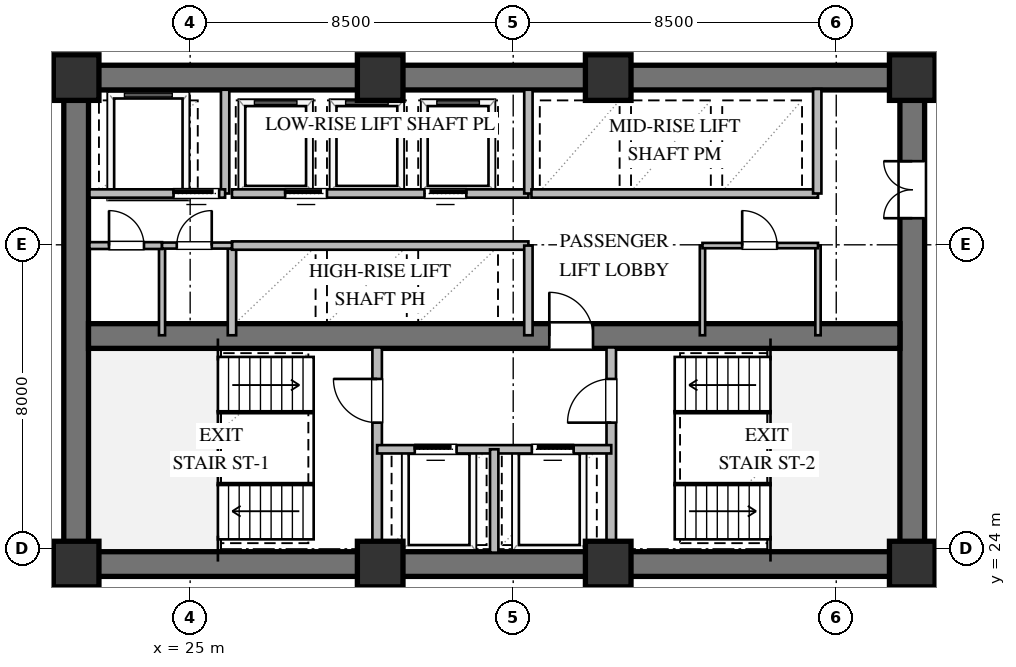
"""IFC4 building model, lengths in metres.
Left out: names, types, materials, properties, quantities, classifications, styles, units other than length and angle.
Written with IfcOpenShell. Run it as: python <this file> out.ifc"""

import sys

from ifc_helpers import new_model, si_unit, direction, frame, frame_2d, origin, origin_2d, place, context, subcontext, project, spatial, rectangle, extrude, element, fill, save


model = new_model("IFC4")
c1 = context("Model", 3, precision=1e-05, world=origin(), true_north=direction((0.0, 1.0)))
c2 = subcontext(c1, "Body", "Model", "MODEL_VIEW")
j1 = project(units=[si_unit("LENGTHUNIT", "METRE"), si_unit("PLANEANGLEUNIT", "RADIAN")], contexts=[c1])
p1 = place(None, origin())
s1 = spatial("IfcSite", under=j1, at=p1, CompositionType="ELEMENT")
p2 = place(p1, origin())
s2 = spatial("IfcBuilding", under=s1, at=p2, CompositionType="ELEMENT")
p3 = place(p2, frame((0.0, 0.0, 38.4)))
s3 = spatial("IfcBuildingStorey", under=s2, at=p3, CompositionType="ELEMENT", Elevation=38.4)
for number, where, z_axis, x_axis in (
    (1, (21.675, 23.6, 0.0), (0.0, 0.0, 1.0), (1.0, 0.0, 0.0)),
    (2, (21.675, 36.4, 0.0), (0.0, 0.0, 1.0), (1.0, 0.0, 0.0)),
):
    element("IfcWall", number, at=place(p3, frame(where, z_axis=z_axis, x_axis=x_axis)), inside=s3, PredefinedType="SHEAR", context=c2, shape_type="SweptSolid", body=[
        extrude(rectangle(XDim=22.65, YDim=0.65, at=frame_2d((11.325, 0.0))), origin(), (0.0, 0.0, 1.0), 3.36),
    ])
p4 = place(p3, frame((22.0, 23.925, 0.0), z_axis=(0.0, 0.0, 1.0), x_axis=(0.0, 1.0, 0.0)))
e3 = element("IfcWall", 3, at=p4, inside=s3, PredefinedType="SHEAR", context=c2, shape_type="SweptSolid", body=[
    extrude(rectangle(XDim=12.15, YDim=0.65, at=frame_2d((6.075, 0.0))), origin(), (0.0, 0.0, 1.0), 3.36),
])
p5 = place(p3, frame((44.0, 23.925, 0.0), z_axis=(0.0, 0.0, 1.0), x_axis=(0.0, 1.0, 0.0)))
e4 = element("IfcWall", 4, at=p5, inside=s3, PredefinedType="SHEAR", context=c2, shape_type="SweptSolid", body=[
    extrude(rectangle(XDim=12.15, YDim=0.65, at=frame_2d((6.075, 0.0))), origin(), (0.0, 0.0, 1.0), 3.36),
])
p6 = place(p5, frame((8.775, 0.0, 0.0)))
e5 = element("IfcOpeningElement", 5, at=p6, cuts=e4, PredefinedType="OPENING", context=c2, shape_type="SweptSolid", body=[
    extrude(rectangle(XDim=1.5, YDim=2.15, at=frame_2d((0.75, 1.075))), frame((0.0, 0.335, 0.0), z_axis=(0.0, -1.0, 0.0), x_axis=(1.0, 0.0, 0.0)), (0.0, 0.0, 1.0), 0.67),
])
p7 = place(p3, frame((22.325, 29.6, 0.0), z_axis=(0.0, 0.0, 1.0), x_axis=(1.0, 0.0, 0.0)))
e6 = element("IfcWall", 6, at=p7, inside=s3, PredefinedType="SHEAR", context=c2, shape_type="SweptSolid", body=[
    extrude(rectangle(XDim=21.35, YDim=0.65, at=frame_2d((10.675, 0.0))), origin(), (0.0, 0.0, 1.0), 3.36),
])
p8 = place(p7, frame((12.125, 0.0, 0.0)))
e7 = element("IfcOpeningElement", 7, at=p8, cuts=e6, PredefinedType="OPENING", context=c2, shape_type="SweptSolid", body=[
    extrude(rectangle(XDim=1.15, YDim=2.1, at=frame_2d((0.575, 1.05))), frame((0.0, 0.335, 0.0), z_axis=(0.0, -1.0, 0.0), x_axis=(1.0, 0.0, 0.0)), (0.0, 0.0, 1.0), 0.67),
])
for number, where, z_axis, x_axis in (
    (8, (22.0, 23.6, 0.0), (0.0, 0.0, 1.0), (1.0, 0.0, 0.0)),
    (9, (30.0, 23.6, 0.0), (0.0, 0.0, 1.0), (1.0, 0.0, 0.0)),
    (10, (36.0, 23.6, 0.0), (0.0, 0.0, 1.0), (1.0, 0.0, 0.0)),
    (11, (44.0, 23.6, 0.0), (0.0, 0.0, 1.0), (1.0, 0.0, 0.0)),
    (12, (44.0, 36.4, 0.0), (0.0, 0.0, 1.0), (1.0, 0.0, 0.0)),
    (13, (36.0, 36.4, 0.0), (0.0, 0.0, 1.0), (1.0, 0.0, 0.0)),
    (14, (30.0, 36.4, 0.0), (0.0, 0.0, 1.0), (1.0, 0.0, 0.0)),
    (15, (22.0, 36.4, 0.0), (0.0, 0.0, 1.0), (1.0, 0.0, 0.0)),
):
    element("IfcColumn", number, at=place(p3, frame(where, z_axis=z_axis, x_axis=x_axis)), inside=s3, PredefinedType="COLUMN", context=c2, shape_type="SweptSolid", body=[
        extrude(rectangle(XDim=1.2, YDim=1.2, at=origin_2d()), origin(), (0.0, 0.0, 1.0), 3.6),
    ])
p9 = place(p3, frame((29.92, 23.9, 0.0), z_axis=(0.0, 0.0, 1.0), x_axis=(0.0, 1.0, 0.0)))
e16 = element("IfcWall", 16, at=p9, inside=s3, PredefinedType="SOLIDWALL", context=c2, shape_type="SweptSolid", body=[
    extrude(rectangle(XDim=5.4, YDim=0.25, at=frame_2d((2.7, 0.0))), origin(), (0.0, 0.0, 1.0), 3.36),
])
p10 = place(p9, frame((3.421, 0.0, 0.0)))
e17 = element("IfcOpeningElement", 17, at=p10, cuts=e16, PredefinedType="OPENING", context=c2, shape_type="SweptSolid", body=[
    extrude(rectangle(XDim=1.15, YDim=2.1, at=frame_2d((0.575, 1.05))), frame((0.0, 0.135, 0.0), z_axis=(0.0, -1.0, 0.0), x_axis=(1.0, 0.0, 0.0)), (0.0, 0.0, 1.0), 0.27),
])
p11 = place(p3, frame((36.08, 23.9, 0.0), z_axis=(0.0, 0.0, 1.0), x_axis=(0.0, 1.0, 0.0)))
e18 = element("IfcWall", 18, at=p11, inside=s3, PredefinedType="SOLIDWALL", context=c2, shape_type="SweptSolid", body=[
    extrude(rectangle(XDim=5.4, YDim=0.25, at=frame_2d((2.7, 0.0))), origin(), (0.0, 0.0, 1.0), 3.36),
])
p12 = place(p11, frame((3.421, 0.0, 0.0)))
e19 = element("IfcOpeningElement", 19, at=p12, cuts=e18, PredefinedType="OPENING", context=c2, shape_type="SweptSolid", body=[
    extrude(rectangle(XDim=1.15, YDim=2.1, at=frame_2d((0.575, 1.05))), frame((0.0, 0.135, 0.0), z_axis=(0.0, -1.0, 0.0), x_axis=(1.0, 0.0, 0.0)), (0.0, 0.0, 1.0), 0.27),
])
p13 = place(p3, frame((29.92, 26.62, 0.0), z_axis=(0.0, 0.0, 1.0), x_axis=(1.0, 0.0, 0.0)))
e20 = element("IfcWall", 20, at=p13, inside=s3, PredefinedType="SOLIDWALL", context=c2, shape_type="SweptSolid", body=[
    extrude(rectangle(XDim=6.16, YDim=0.22, at=frame_2d((3.08, 0.0))), origin(), (0.0, 0.0, 1.0), 3.36),
])
p14 = place(p13, frame((0.99, 0.0, 0.0)))
e21 = element("IfcOpeningElement", 21, at=p14, cuts=e20, PredefinedType="OPENING", context=c2, shape_type="SweptSolid", body=[
    extrude(rectangle(XDim=1.1, YDim=2.1, at=frame_2d((0.55, 1.05))), frame((0.0, 0.12, 0.0), z_axis=(0.0, -1.0, 0.0), x_axis=(1.0, 0.0, 0.0)), (0.0, 0.0, 1.0), 0.24),
])
p15 = place(p13, frame((4.07, 0.0, 0.0)))
e22 = element("IfcOpeningElement", 22, at=p15, cuts=e20, PredefinedType="OPENING", context=c2, shape_type="SweptSolid", body=[
    extrude(rectangle(XDim=1.1, YDim=2.1, at=frame_2d((0.55, 1.05))), frame((0.0, 0.12, 0.0), z_axis=(0.0, -1.0, 0.0), x_axis=(1.0, 0.0, 0.0)), (0.0, 0.0, 1.0), 0.24),
])
p16 = place(p3, frame((33.0, 23.9, 0.0), z_axis=(0.0, 0.0, 1.0), x_axis=(0.0, 1.0, 0.0)))
e23 = element("IfcWall", 23, at=p16, inside=s3, PredefinedType="SOLIDWALL", context=c2, shape_type="SweptSolid", body=[
    extrude(rectangle(XDim=2.72, YDim=0.22, at=frame_2d((1.36, 0.0))), origin(), (0.0, 0.0, 1.0), 3.36),
])
p17 = place(p3, frame((25.92, 33.35, 0.0), z_axis=(0.0, 0.0, 1.0), x_axis=(0.0, 1.0, 0.0)))
e24 = element("IfcWall", 24, at=p17, inside=s3, PredefinedType="SOLIDWALL", context=c2, shape_type="SweptSolid", body=[
    extrude(rectangle(XDim=2.73, YDim=0.22, at=frame_2d((1.365, 0.0))), origin(), (0.0, 0.0, 1.0), 3.36),
])
p18 = place(p3, frame((22.35, 33.35, 0.0), z_axis=(0.0, 0.0, 1.0), x_axis=(1.0, 0.0, 0.0)))
e25 = element("IfcWall", 25, at=p18, inside=s3, PredefinedType="SOLIDWALL", context=c2, shape_type="SweptSolid", body=[
    extrude(rectangle(XDim=3.57, YDim=0.22, at=frame_2d((1.785, 0.0))), origin(), (0.0, 0.0, 1.0), 3.36),
])
p19 = place(p18, frame((2.213, 0.0, 0.0)))
e26 = element("IfcOpeningElement", 26, at=p19, cuts=e25, PredefinedType="OPENING", context=c2, shape_type="SweptSolid", body=[
    extrude(rectangle(XDim=1.2, YDim=2.1, at=frame_2d((0.6, 1.05))), frame((0.0, 0.12, 0.0), z_axis=(0.0, -1.0, 0.0), x_axis=(1.0, 0.0, 0.0)), (0.0, 0.0, 1.0), 0.24),
])
p20 = place(p3, frame((26.1, 29.62, 0.0), z_axis=(0.0, 0.0, 1.0), x_axis=(0.0, 1.0, 0.0)))
e27 = element("IfcWall", 27, at=p20, inside=s3, PredefinedType="SOLIDWALL", context=c2, shape_type="SweptSolid", body=[
    extrude(rectangle(XDim=2.36, YDim=0.22, at=frame_2d((1.18, 0.0))), origin(), (0.0, 0.0, 1.0), 3.36),
])
p21 = place(p3, frame((26.1, 31.98, 0.0), z_axis=(0.0, 0.0, 1.0), x_axis=(1.0, 0.0, 0.0)))
e28 = element("IfcWall", 28, at=p21, inside=s3, PredefinedType="SOLIDWALL", context=c2, shape_type="SweptSolid", body=[
    extrude(rectangle(XDim=7.8, YDim=0.22, at=frame_2d((3.9, 0.0))), origin(), (0.0, 0.0, 1.0), 3.36),
])
p22 = place(p3, frame((33.9, 29.62, 0.0), z_axis=(0.0, 0.0, 1.0), x_axis=(0.0, 1.0, 0.0)))
e29 = element("IfcWall", 29, at=p22, inside=s3, PredefinedType="SOLIDWALL", context=c2, shape_type="SweptSolid", body=[
    extrude(rectangle(XDim=2.36, YDim=0.22, at=frame_2d((1.18, 0.0))), origin(), (0.0, 0.0, 1.0), 3.36),
])
p23 = place(p3, frame((26.1, 33.35, 0.0), z_axis=(0.0, 0.0, 1.0), x_axis=(1.0, 0.0, 0.0)))
e30 = element("IfcWall", 30, at=p23, inside=s3, PredefinedType="SOLIDWALL", context=c2, shape_type="SweptSolid", body=[
    extrude(rectangle(XDim=7.8, YDim=0.22, at=frame_2d((3.9, 0.0))), origin(), (0.0, 0.0, 1.0), 3.36),
])
p24 = place(p23, frame((1.4, 0.0, 0.0)))
e31 = element("IfcOpeningElement", 31, at=p24, cuts=e30, PredefinedType="OPENING", context=c2, shape_type="SweptSolid", body=[
    extrude(rectangle(XDim=1.1, YDim=2.1, at=frame_2d((0.55, 1.05))), frame((0.0, 0.12, 0.0), z_axis=(0.0, -1.0, 0.0), x_axis=(1.0, 0.0, 0.0)), (0.0, 0.0, 1.0), 0.24),
])
p25 = place(p23, frame((5.066, 0.0, 0.0)))
e32 = element("IfcOpeningElement", 32, at=p25, cuts=e30, PredefinedType="OPENING", context=c2, shape_type="SweptSolid", body=[
    extrude(rectangle(XDim=1.1, YDim=2.1, at=frame_2d((0.55, 1.05))), frame((0.0, 0.12, 0.0), z_axis=(0.0, -1.0, 0.0), x_axis=(1.0, 0.0, 0.0)), (0.0, 0.0, 1.0), 0.24),
])
p26 = place(p3, frame((33.9, 33.35, 0.0), z_axis=(0.0, 0.0, 1.0), x_axis=(0.0, 1.0, 0.0)))
e33 = element("IfcWall", 33, at=p26, inside=s3, PredefinedType="SOLIDWALL", context=c2, shape_type="SweptSolid", body=[
    extrude(rectangle(XDim=2.73, YDim=0.22, at=frame_2d((1.365, 0.0))), origin(), (0.0, 0.0, 1.0), 3.36),
])
p27 = place(p3, frame((33.98, 33.35, 0.0), z_axis=(0.0, 0.0, 1.0), x_axis=(1.0, 0.0, 0.0)))
e34 = element("IfcWall", 34, at=p27, inside=s3, PredefinedType="SOLIDWALL", context=c2, shape_type="SweptSolid", body=[
    extrude(rectangle(XDim=7.54, YDim=0.22, at=frame_2d((3.77, 0.0))), origin(), (0.0, 0.0, 1.0), 3.36),
])
p28 = place(p3, frame((41.5, 33.35, 0.0), z_axis=(0.0, 0.0, 1.0), x_axis=(0.0, 1.0, 0.0)))
e35 = element("IfcWall", 35, at=p28, inside=s3, PredefinedType="SOLIDWALL", context=c2, shape_type="SweptSolid", body=[
    extrude(rectangle(XDim=2.75, YDim=0.22, at=frame_2d((1.375, 0.0))), origin(), (0.0, 0.0, 1.0), 3.36),
])
p29 = place(p3, frame((24.26, 29.62, 0.0), z_axis=(0.0, 0.0, 1.0), x_axis=(0.0, 1.0, 0.0)))
e36 = element("IfcWall", 36, at=p29, inside=s3, PredefinedType="PLUMBINGWALL", context=c2, shape_type="SweptSolid", body=[
    extrude(rectangle(XDim=2.36, YDim=0.16, at=frame_2d((1.18, 0.0))), origin(), (0.0, 0.0, 1.0), 3.36),
])
p30 = place(p3, frame((22.35, 31.98, 0.0), z_axis=(0.0, 0.0, 1.0), x_axis=(1.0, 0.0, 0.0)))
e37 = element("IfcWall", 37, at=p30, inside=s3, PredefinedType="PARTITIONING", context=c2, shape_type="SweptSolid", body=[
    extrude(rectangle(XDim=1.91, YDim=0.18, at=frame_2d((0.955, 0.0))), origin(), (0.0, 0.0, 1.0), 3.36),
])
p31 = place(p30, frame((0.515, 0.0, 0.0)))
e38 = element("IfcOpeningElement", 38, at=p31, cuts=e37, PredefinedType="OPENING", context=c2, shape_type="SweptSolid", body=[
    extrude(rectangle(XDim=0.92, YDim=2.1, at=frame_2d((0.46, 1.05))), frame((0.0, 0.1, 0.0), z_axis=(0.0, -1.0, 0.0), x_axis=(1.0, 0.0, 0.0)), (0.0, 0.0, 1.0), 0.2),
])
p32 = place(p3, frame((24.26, 31.98, 0.0), z_axis=(0.0, 0.0, 1.0), x_axis=(1.0, 0.0, 0.0)))
e39 = element("IfcWall", 39, at=p32, inside=s3, PredefinedType="PLUMBINGWALL", context=c2, shape_type="SweptSolid", body=[
    extrude(rectangle(XDim=1.84, YDim=0.16, at=frame_2d((0.92, 0.0))), origin(), (0.0, 0.0, 1.0), 3.36),
])
p33 = place(p32, frame((0.388, 0.0, 0.0)))
e40 = element("IfcOpeningElement", 40, at=p33, cuts=e39, PredefinedType="OPENING", context=c2, shape_type="SweptSolid", body=[
    extrude(rectangle(XDim=0.92, YDim=2.1, at=frame_2d((0.46, 1.05))), frame((0.0, 0.09, 0.0), z_axis=(0.0, -1.0, 0.0), x_axis=(1.0, 0.0, 0.0)), (0.0, 0.0, 1.0), 0.18),
])
for number, where, z_axis, x_axis in (
    (41, (38.48, 29.62, 0.0), (0.0, 0.0, 1.0), (0.0, 1.0, 0.0)),
    (42, (41.52, 29.62, 0.0), (0.0, 0.0, 1.0), (0.0, 1.0, 0.0)),
):
    element("IfcWall", number, at=place(p3, frame(where, z_axis=z_axis, x_axis=x_axis)), inside=s3, PredefinedType="PARTITIONING", context=c2, shape_type="SweptSolid", body=[
        extrude(rectangle(XDim=2.36, YDim=0.14, at=frame_2d((1.18, 0.0))), origin(), (0.0, 0.0, 1.0), 3.36),
    ])
p34 = place(p3, frame((38.48, 31.98, 0.0), z_axis=(0.0, 0.0, 1.0), x_axis=(1.0, 0.0, 0.0)))
e43 = element("IfcWall", 43, at=p34, inside=s3, PredefinedType="PARTITIONING", context=c2, shape_type="SweptSolid", body=[
    extrude(rectangle(XDim=3.04, YDim=0.14, at=frame_2d((1.52, 0.0))), origin(), (0.0, 0.0, 1.0), 3.36),
])
p35 = place(p34, frame((1.045, 0.0, 0.0)))
e44 = element("IfcOpeningElement", 44, at=p35, cuts=e43, PredefinedType="OPENING", context=c2, shape_type="SweptSolid", body=[
    extrude(rectangle(XDim=0.92, YDim=2.1, at=frame_2d((0.46, 1.05))), frame((0.0, 0.08, 0.0), z_axis=(0.0, -1.0, 0.0), x_axis=(1.0, 0.0, 0.0)), (0.0, 0.0, 1.0), 0.16),
])
p36 = place(p10, origin())
e45 = element("IfcDoor", 45, at=p36, inside=s3, OperationType="SINGLE_SWING_RIGHT", PredefinedType="DOOR", context=c2, shape_type="SweptSolid", body=[
    extrude(rectangle(XDim=1.15, YDim=2.1, at=frame_2d((0.575, 1.05))), frame((0.0, 0.025, 0.0), z_axis=(0.0, -1.0, 0.0), x_axis=(1.0, 0.0, 0.0)), (0.0, 0.0, 1.0), 0.05),
])
fill(e17, e45)
p37 = place(p12, origin())
e46 = element("IfcDoor", 46, at=p37, inside=s3, OperationType="SINGLE_SWING_LEFT", PredefinedType="DOOR", context=c2, shape_type="SweptSolid", body=[
    extrude(rectangle(XDim=1.15, YDim=2.1, at=frame_2d((0.575, 1.05))), frame((0.0, 0.025, 0.0), z_axis=(0.0, -1.0, 0.0), x_axis=(1.0, 0.0, 0.0)), (0.0, 0.0, 1.0), 0.05),
])
fill(e19, e46)
p38 = place(p14, origin())
e47 = element("IfcDoor", 47, at=p38, inside=s3, OperationType="SLIDING_TO_LEFT", PredefinedType="DOOR", context=c2, shape_type="SweptSolid", body=[
    extrude(rectangle(XDim=1.1, YDim=2.1, at=frame_2d((0.55, 1.05))), frame((0.0, 0.025, 0.0), z_axis=(0.0, -1.0, 0.0), x_axis=(1.0, 0.0, 0.0)), (0.0, 0.0, 1.0), 0.05),
])
fill(e21, e47)
p39 = place(p15, origin())
e48 = element("IfcDoor", 48, at=p39, inside=s3, OperationType="SLIDING_TO_RIGHT", PredefinedType="DOOR", context=c2, shape_type="SweptSolid", body=[
    extrude(rectangle(XDim=1.1, YDim=2.1, at=frame_2d((0.55, 1.05))), frame((0.0, 0.025, 0.0), z_axis=(0.0, -1.0, 0.0), x_axis=(1.0, 0.0, 0.0)), (0.0, 0.0, 1.0), 0.05),
])
fill(e22, e48)
p40 = place(p8, origin())
e49 = element("IfcDoor", 49, at=p40, inside=s3, OperationType="SINGLE_SWING_LEFT", PredefinedType="DOOR", context=c2, shape_type="SweptSolid", body=[
    extrude(rectangle(XDim=1.15, YDim=2.1, at=frame_2d((0.575, 1.05))), frame((0.0, 0.025, 0.0), z_axis=(0.0, -1.0, 0.0), x_axis=(1.0, 0.0, 0.0)), (0.0, 0.0, 1.0), 0.05),
])
fill(e7, e49)
p41 = place(p6, origin())
e50 = element("IfcDoor", 50, at=p41, inside=s3, OperationType="DOUBLE_DOOR_SINGLE_SWING", PredefinedType="DOOR", context=c2, shape_type="SweptSolid", body=[
    extrude(rectangle(XDim=1.5, YDim=2.15, at=frame_2d((0.75, 1.075))), frame((0.0, 0.025, 0.0), z_axis=(0.0, -1.0, 0.0), x_axis=(1.0, 0.0, 0.0)), (0.0, 0.0, 1.0), 0.05),
])
fill(e5, e50)
p42 = place(p19, origin())
e51 = element("IfcDoor", 51, at=p42, inside=s3, OperationType="SLIDING_TO_LEFT", PredefinedType="DOOR", context=c2, shape_type="SweptSolid", body=[
    extrude(rectangle(XDim=1.2, YDim=2.1, at=frame_2d((0.6, 1.05))), frame((0.0, 0.025, 0.0), z_axis=(0.0, -1.0, 0.0), x_axis=(1.0, 0.0, 0.0)), (0.0, 0.0, 1.0), 0.05),
])
fill(e26, e51)
p43 = place(p24, origin())
e52 = element("IfcDoor", 52, at=p43, inside=s3, OperationType="SLIDING_TO_LEFT", PredefinedType="DOOR", context=c2, shape_type="SweptSolid", body=[
    extrude(rectangle(XDim=1.1, YDim=2.1, at=frame_2d((0.55, 1.05))), frame((0.0, 0.025, 0.0), z_axis=(0.0, -1.0, 0.0), x_axis=(1.0, 0.0, 0.0)), (0.0, 0.0, 1.0), 0.05),
])
fill(e31, e52)
p44 = place(p25, origin())
e53 = element("IfcDoor", 53, at=p44, inside=s3, OperationType="SLIDING_TO_RIGHT", PredefinedType="DOOR", context=c2, shape_type="SweptSolid", body=[
    extrude(rectangle(XDim=1.1, YDim=2.1, at=frame_2d((0.55, 1.05))), frame((0.0, 0.025, 0.0), z_axis=(0.0, -1.0, 0.0), x_axis=(1.0, 0.0, 0.0)), (0.0, 0.0, 1.0), 0.05),
])
fill(e32, e53)
p45 = place(p31, origin())
e54 = element("IfcDoor", 54, at=p45, inside=s3, OperationType="SINGLE_SWING_LEFT", PredefinedType="DOOR", context=c2, shape_type="SweptSolid", body=[
    extrude(rectangle(XDim=0.92, YDim=2.1, at=frame_2d((0.46, 1.05))), frame((0.0, 0.025, 0.0), z_axis=(0.0, -1.0, 0.0), x_axis=(1.0, 0.0, 0.0)), (0.0, 0.0, 1.0), 0.05),
])
fill(e38, e54)
p46 = place(p33, origin())
e55 = element("IfcDoor", 55, at=p46, inside=s3, OperationType="SINGLE_SWING_RIGHT", PredefinedType="DOOR", context=c2, shape_type="SweptSolid", body=[
    extrude(rectangle(XDim=0.92, YDim=2.1, at=frame_2d((0.46, 1.05))), frame((0.0, 0.025, 0.0), z_axis=(0.0, -1.0, 0.0), x_axis=(1.0, 0.0, 0.0)), (0.0, 0.0, 1.0), 0.05),
])
fill(e40, e55)
p47 = place(p35, origin())
e56 = element("IfcDoor", 56, at=p47, inside=s3, OperationType="SINGLE_SWING_LEFT", PredefinedType="DOOR", context=c2, shape_type="SweptSolid", body=[
    extrude(rectangle(XDim=0.92, YDim=2.1, at=frame_2d((0.46, 1.05))), frame((0.0, 0.025, 0.0), z_axis=(0.0, -1.0, 0.0), x_axis=(1.0, 0.0, 0.0)), (0.0, 0.0, 1.0), 0.05),
])
fill(e44, e56)
save(model, sys.argv[1])
